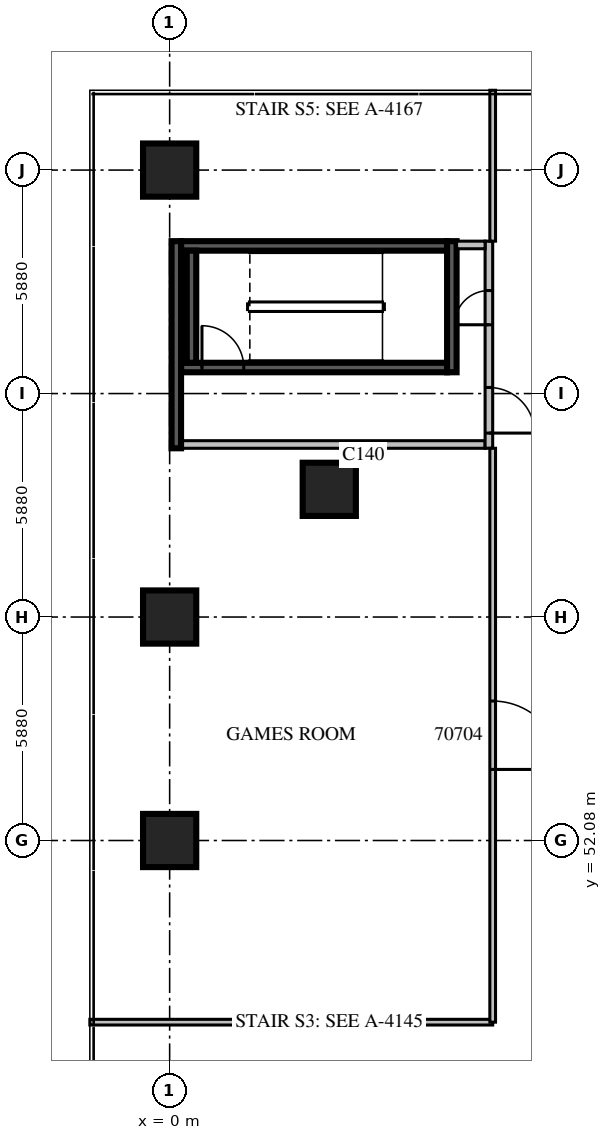
"""IFC4 building model, lengths in metres.
Left out: names, types, materials, properties, quantities, classifications, styles, units other than length and angle.
Written with IfcOpenShell. Run it as: python <this file> out.ifc"""

import sys

from ifc_helpers import new_model, si_unit, direction, frame, frame_2d, origin, origin_2d, place, context, subcontext, project, spatial, rectangle, extrude, source, transform, mapped, element, fill, save


model = new_model("IFC4")
c1 = context("Model", 3, precision=1e-05, world=origin(), true_north=direction((0.0, 1.0)))
c2 = subcontext(c1, "Body", "Model", "MODEL_VIEW")
j1 = project(units=[si_unit("LENGTHUNIT", "METRE"), si_unit("PLANEANGLEUNIT", "RADIAN")], contexts=[c1])
p1 = place(None, origin())
s1 = spatial("IfcSite", under=j1, at=p1, CompositionType="ELEMENT")
p2 = place(p1, origin())
s2 = spatial("IfcBuilding", under=s1, at=p2, CompositionType="ELEMENT")
p3 = place(p2, frame((0.0, 0.0, 23.7)))
s3 = spatial("IfcBuildingStorey", under=s2, at=p3, CompositionType="ELEMENT", Elevation=23.7)
m1 = source(origin(), c2, "Body", "SweptSolid", [
    extrude(rectangle(XDim=1.4, YDim=1.4, at=origin_2d()), origin(), (0.0, 0.0, 1.0), 5.4),
])
for number, where, z_axis, x_axis in (
    (1, (0.0, 52.08, 0.0), (0.0, 0.0, 1.0), (1.0, 0.0, 0.0)),
    (2, (0.0, 57.96, 0.0), (0.0, 0.0, 1.0), (1.0, 0.0, 0.0)),
    (3, (0.0, 69.72, 0.0), (0.0, 0.0, 1.0), (1.0, 0.0, 0.0)),
    (4, (4.2, 61.32, 0.0), (0.0, 0.0, 1.0), (1.0, 0.0, 0.0)),
):
    element("IfcColumn", number, at=place(p3, frame(where, z_axis=z_axis, x_axis=x_axis)), inside=s3, PredefinedType="COLUMN", context=c2, shape_type="MappedRepresentation", body=[
        mapped(m1, transform((0.0, 0.0, 0.0), scale=1.0)),
    ])
m2 = source(origin(), c2, "Body", "SweptSolid", [
    extrude(rectangle(XDim=7.0, YDim=0.25, at=frame_2d((3.5, 0.0))), origin(), (0.0, 0.0, 1.0), 4.8),
])
p4 = place(p3, frame((0.3, 64.525, 0.0), z_axis=(0.0, 0.0, 1.0), x_axis=(1.0, 0.0, 0.0)))
e5 = element("IfcWall", 5, at=p4, inside=s3, PredefinedType="SOLIDWALL", context=c2, shape_type="MappedRepresentation", body=[
    mapped(m2, transform((0.0, 0.0, 0.0), scale=1.0)),
])
m3 = source(origin(), c2, "Body", "SweptSolid", [
    extrude(rectangle(XDim=1.1, YDim=2.1, at=frame_2d((0.55, 1.05))), frame((0.0, 0.135, 0.0), z_axis=(0.0, -1.0, 0.0), x_axis=(1.0, 0.0, 0.0)), (0.0, 0.0, 1.0), 0.27),
])
p5 = place(p4, frame((0.55, 0.0, 0.0)))
e6 = element("IfcOpeningElement", 6, at=p5, cuts=e5, PredefinedType="OPENING", context=c2, shape_type="MappedRepresentation", body=[
    mapped(m3, transform((0.0, 0.0, 0.0), scale=1.0)),
])
p6 = place(p3, frame((0.3, 67.725, 0.0), z_axis=(0.0, 0.0, 1.0), x_axis=(1.0, 0.0, 0.0)))
e7 = element("IfcWall", 7, at=p6, inside=s3, PredefinedType="SOLIDWALL", context=c2, shape_type="MappedRepresentation", body=[
    mapped(m2, transform((0.0, 0.0, 0.0), scale=1.0)),
])
m4 = source(origin(), c2, "Body", "SweptSolid", [
    extrude(rectangle(XDim=3.45, YDim=0.25, at=frame_2d((1.725, 0.0))), origin(), (0.0, 0.0, 1.0), 4.8),
])
p7 = place(p3, frame((7.425, 64.4, 0.0), z_axis=(0.0, 0.0, 1.0), x_axis=(0.0, 1.0, 0.0)))
e8 = element("IfcWall", 8, at=p7, inside=s3, PredefinedType="SOLIDWALL", context=c2, shape_type="MappedRepresentation", body=[
    mapped(m4, transform((0.0, 0.0, 0.0), scale=1.0)),
])
m5 = source(origin(), c2, "Body", "SweptSolid", [
    extrude(rectangle(XDim=2.95, YDim=0.25, at=frame_2d((1.475, 0.0))), origin(), (0.0, 0.0, 1.0), 4.8),
])
p8 = place(p3, frame((0.575, 64.65, 0.0), z_axis=(0.0, 0.0, 1.0), x_axis=(0.0, 1.0, 0.0)))
e9 = element("IfcWall", 9, at=p8, inside=s3, PredefinedType="SOLIDWALL", context=c2, shape_type="MappedRepresentation", body=[
    mapped(m5, transform((0.0, 0.0, 0.0), scale=1.0)),
])
m6 = source(origin(), c2, "Body", "SweptSolid", [
    extrude(rectangle(XDim=8.0, YDim=0.2, at=frame_2d((4.0, 0.0))), origin(), (0.0, 0.0, 1.0), 4.8),
])
p9 = place(p3, frame((0.3, 62.5, 0.0), z_axis=(0.0, 0.0, 1.0), x_axis=(1.0, 0.0, 0.0)))
e10 = element("IfcWall", 10, at=p9, inside=s3, PredefinedType="PARTITIONING", context=c2, shape_type="MappedRepresentation", body=[
    mapped(m6, transform((0.0, 0.0, 0.0), scale=1.0)),
])
m7 = source(origin(), c2, "Body", "SweptSolid", [
    extrude(rectangle(XDim=5.45, YDim=0.2, at=frame_2d((2.725, 0.0))), origin(), (0.0, 0.0, 1.0), 4.8),
])
p10 = place(p3, frame((8.4, 62.4, 0.0), z_axis=(0.0, 0.0, 1.0), x_axis=(0.0, 1.0, 0.0)))
e11 = element("IfcWall", 11, at=p10, inside=s3, PredefinedType="PARTITIONING", context=c2, shape_type="MappedRepresentation", body=[
    mapped(m7, transform((0.0, 0.0, 0.0), scale=1.0)),
])
m8 = source(origin(), c2, "Body", "SweptSolid", [
    extrude(rectangle(XDim=1.2, YDim=2.1, at=frame_2d((0.6, 1.05))), frame((0.0, 0.11, 0.0), z_axis=(0.0, -1.0, 0.0), x_axis=(1.0, 0.0, 0.0)), (0.0, 0.0, 1.0), 0.22),
])
p11 = place(p10, frame((0.4, 0.0, 0.0)))
e12 = element("IfcOpeningElement", 12, at=p11, cuts=e11, PredefinedType="OPENING", context=c2, shape_type="MappedRepresentation", body=[
    mapped(m8, transform((0.0, 0.0, 0.0), scale=1.0)),
])
m9 = source(origin(), c2, "Body", "SweptSolid", [
    extrude(rectangle(XDim=0.9, YDim=2.1, at=frame_2d((0.45, 1.05))), frame((0.0, 0.11, 0.0), z_axis=(0.0, -1.0, 0.0), x_axis=(1.0, 0.0, 0.0)), (0.0, 0.0, 1.0), 0.22),
])
p12 = place(p10, frame((3.25, 0.0, 0.0)))
e13 = element("IfcOpeningElement", 13, at=p12, cuts=e11, PredefinedType="OPENING", context=c2, shape_type="MappedRepresentation", body=[
    mapped(m9, transform((0.0, 0.0, 0.0), scale=1.0)),
])
m10 = source(origin(), c2, "Body", "SweptSolid", [
    extrude(rectangle(XDim=0.75, YDim=0.2, at=frame_2d((0.375, 0.0))), origin(), (0.0, 0.0, 1.0), 4.8),
])
p13 = place(p3, frame((7.55, 67.75, 0.0), z_axis=(0.0, 0.0, 1.0), x_axis=(1.0, 0.0, 0.0)))
e14 = element("IfcWall", 14, at=p13, inside=s3, PredefinedType="PARTITIONING", context=c2, shape_type="MappedRepresentation", body=[
    mapped(m10, transform((0.0, 0.0, 0.0), scale=1.0)),
])
m11 = source(origin(), c2, "Body", "SweptSolid", [
    extrude(rectangle(XDim=5.45, YDim=0.25, at=frame_2d((2.725, 0.0))), origin(), (0.0, 0.0, 1.0), 4.8),
])
p14 = place(p3, frame((0.175, 62.4, 0.0), z_axis=(0.0, 0.0, 1.0), x_axis=(0.0, 1.0, 0.0)))
e15 = element("IfcWall", 15, at=p14, inside=s3, PredefinedType="SOLIDWALL", context=c2, shape_type="MappedRepresentation", body=[
    mapped(m11, transform((0.0, 0.0, 0.0), scale=1.0)),
])
m12 = source(origin(), c2, "Body", "SweptSolid", [
    extrude(rectangle(XDim=10.6, YDim=0.15, at=frame_2d((5.3, 0.0))), origin(), (0.0, 0.0, 1.0), 4.8),
])
p15 = place(p3, frame((-2.1, 47.3, 0.0), z_axis=(0.0, 0.0, 1.0), x_axis=(1.0, 0.0, 0.0)))
e16 = element("IfcWall", 16, at=p15, inside=s3, PredefinedType="PARTITIONING", context=c2, shape_type="MappedRepresentation", body=[
    mapped(m12, transform((0.0, 0.0, 0.0), scale=1.0)),
])
m13 = source(origin(), c2, "Body", "SweptSolid", [
    extrude(rectangle(XDim=15.1, YDim=0.15, at=frame_2d((7.55, 0.0))), origin(), (0.0, 0.0, 1.0), 4.8),
])
p16 = place(p3, frame((8.5, 47.3, 0.0), z_axis=(0.0, 0.0, 1.0), x_axis=(0.0, 1.0, 0.0)))
e17 = element("IfcWall", 17, at=p16, inside=s3, PredefinedType="PARTITIONING", context=c2, shape_type="MappedRepresentation", body=[
    mapped(m13, transform((0.0, 0.0, 0.0), scale=1.0)),
])
m14 = source(origin(), c2, "Body", "SweptSolid", [
    extrude(rectangle(XDim=1.8, YDim=2.1, at=frame_2d((0.9, 1.05))), frame((0.0, 0.085, 0.0), z_axis=(0.0, -1.0, 0.0), x_axis=(1.0, 0.0, 0.0)), (0.0, 0.0, 1.0), 0.17),
])
p17 = place(p16, frame((6.65, 0.0, 0.0)))
e18 = element("IfcOpeningElement", 18, at=p17, cuts=e17, PredefinedType="OPENING", context=c2, shape_type="MappedRepresentation", body=[
    mapped(m14, transform((0.0, 0.0, 0.0), scale=1.0)),
])
m15 = source(origin(), c2, "Body", "SweptSolid", [
    extrude(rectangle(XDim=3.97, YDim=0.15, at=frame_2d((1.985, 0.0))), origin(), (0.0, 0.0, 1.0), 4.8),
])
p18 = place(p3, frame((8.5, 67.85, 0.0), z_axis=(0.0, 0.0, 1.0), x_axis=(0.0, 1.0, 0.0)))
e19 = element("IfcWall", 19, at=p18, inside=s3, PredefinedType="PARTITIONING", context=c2, shape_type="MappedRepresentation", body=[
    mapped(m15, transform((0.0, 0.0, 0.0), scale=1.0)),
])
m16 = source(origin(), c2, "Body", "SweptSolid", [
    extrude(rectangle(XDim=1.1, YDim=2.1, at=frame_2d((0.55, 1.05))), frame((0.0, 0.025, 0.0), z_axis=(0.0, -1.0, 0.0), x_axis=(1.0, 0.0, 0.0)), (0.0, 0.0, 1.0), 0.05),
])
p19 = place(p5, origin())
e20 = element("IfcDoor", 20, at=p19, inside=s3, OperationType="SINGLE_SWING_LEFT", PredefinedType="DOOR", context=c2, shape_type="MappedRepresentation", body=[
    mapped(m16, transform((0.0, 0.0, 0.0), scale=1.0)),
])
fill(e6, e20)
m17 = source(origin(), c2, "Body", "SweptSolid", [
    extrude(rectangle(XDim=1.2, YDim=2.1, at=frame_2d((0.6, 1.05))), frame((0.0, 0.025, 0.0), z_axis=(0.0, -1.0, 0.0), x_axis=(1.0, 0.0, 0.0)), (0.0, 0.0, 1.0), 0.05),
])
p20 = place(p11, origin())
e21 = element("IfcDoor", 21, at=p20, inside=s3, OperationType="SINGLE_SWING_RIGHT", PredefinedType="DOOR", context=c2, shape_type="MappedRepresentation", body=[
    mapped(m17, transform((0.0, 0.0, 0.0), scale=1.0)),
])
fill(e12, e21)
m18 = source(origin(), c2, "Body", "SweptSolid", [
    extrude(rectangle(XDim=0.9, YDim=2.1, at=frame_2d((0.45, 1.05))), frame((0.0, 0.025, 0.0), z_axis=(0.0, -1.0, 0.0), x_axis=(1.0, 0.0, 0.0)), (0.0, 0.0, 1.0), 0.05),
])
p21 = place(p12, origin())
e22 = element("IfcDoor", 22, at=p21, inside=s3, OperationType="SINGLE_SWING_LEFT", PredefinedType="DOOR", context=c2, shape_type="MappedRepresentation", body=[
    mapped(m18, transform((0.0, 0.0, 0.0), scale=1.0)),
])
fill(e13, e22)
m19 = source(origin(), c2, "Body", "SweptSolid", [
    extrude(rectangle(XDim=1.8, YDim=2.1, at=frame_2d((0.9, 1.05))), frame((0.0, 0.025, 0.0), z_axis=(0.0, -1.0, 0.0), x_axis=(1.0, 0.0, 0.0)), (0.0, 0.0, 1.0), 0.05),
])
p22 = place(p17, origin())
e23 = element("IfcDoor", 23, at=p22, inside=s3, OperationType="DOUBLE_DOOR_SINGLE_SWING", PredefinedType="DOOR", context=c2, shape_type="MappedRepresentation", body=[
    mapped(m19, transform((0.0, 0.0, 0.0), scale=1.0)),
])
fill(e18, e23)
save(model, sys.argv[1])
